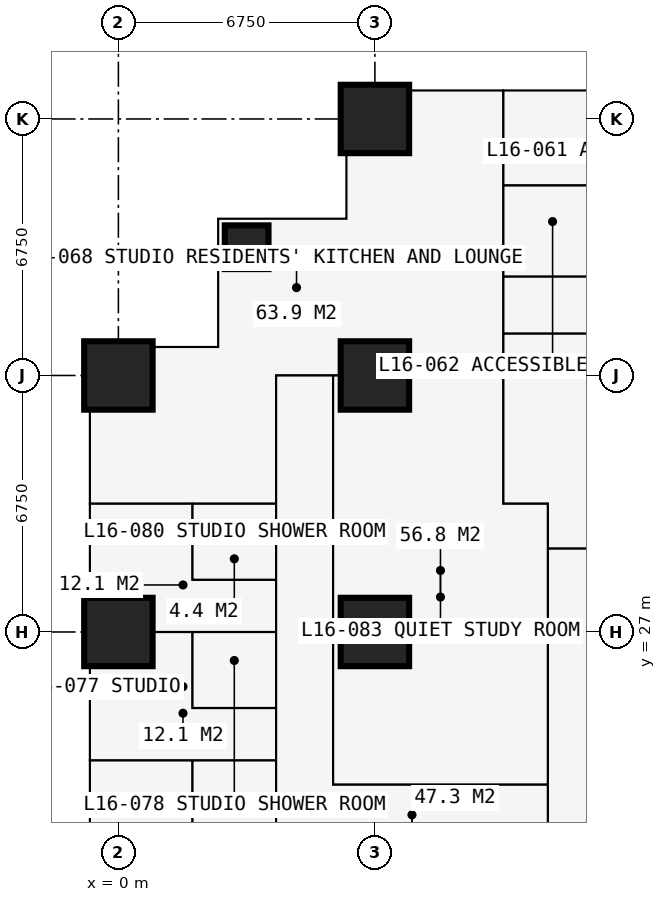
"""IFC4 building model, lengths in metres.
Left out: names, types, materials, properties, quantities, classifications, styles, units other than length and angle.
Written with IfcOpenShell. Run it as: python <this file> out.ifc"""

import sys

from ifc_helpers import new_model, si_unit, direction, frame, frame_2d, origin, origin_2d, place, context, subcontext, project, spatial, rectangle, extrude, element, fill, save


model = new_model("IFC4")
c1 = context("Model", 3, precision=1e-05, world=origin(), true_north=direction((0.0, 1.0)))
c2 = subcontext(c1, "Body", "Model", "MODEL_VIEW")
j1 = project(units=[si_unit("LENGTHUNIT", "METRE"), si_unit("PLANEANGLEUNIT", "RADIAN")], contexts=[c1])
p1 = place(None, origin())
s1 = spatial("IfcSite", under=j1, at=p1, CompositionType="ELEMENT")
p2 = place(p1, origin())
s2 = spatial("IfcBuilding", under=s1, at=p2, CompositionType="ELEMENT")
p3 = place(p2, frame((0.0, 0.0, 61.2)))
s3 = spatial("IfcBuildingStorey", under=s2, at=p3, CompositionType="ELEMENT", Elevation=61.2)
for number, where, z_axis, x_axis in (
    (1, (0.0, 27.0, 0.0), (0.0, 0.0, 1.0), (1.0, 0.0, 0.0)),
    (2, (0.0, 33.75, 0.0), (0.0, 0.0, 1.0), (1.0, 0.0, 0.0)),
):
    element("IfcColumn", number, at=place(p3, frame(where, z_axis=z_axis, x_axis=x_axis)), inside=s3, PredefinedType="COLUMN", context=c2, shape_type="SweptSolid", body=[
        extrude(rectangle(XDim=1.8, YDim=1.8, at=origin_2d()), origin(), (0.0, 0.0, 1.0), 3.6),
    ])
p4 = place(p3, frame((3.375, 37.125, 0.0), z_axis=(0.0, 0.0, 1.0), x_axis=(1.0, 0.0, 0.0)))
e3 = element("IfcColumn", 3, at=p4, inside=s3, PredefinedType="COLUMN", context=c2, shape_type="SweptSolid", body=[
    extrude(rectangle(XDim=1.15, YDim=1.15, at=origin_2d()), origin(), (0.0, 0.0, 1.0), 3.6),
])
for number, where, z_axis, x_axis in (
    (4, (6.75, 27.0, 0.0), (0.0, 0.0, 1.0), (1.0, 0.0, 0.0)),
    (5, (6.75, 33.75, 0.0), (0.0, 0.0, 1.0), (1.0, 0.0, 0.0)),
    (6, (6.75, 40.5, 0.0), (0.0, 0.0, 1.0), (1.0, 0.0, 0.0)),
):
    element("IfcColumn", number, at=place(p3, frame(where, z_axis=z_axis, x_axis=x_axis)), inside=s3, PredefinedType="COLUMN", context=c2, shape_type="SweptSolid", body=[
        extrude(rectangle(XDim=1.8, YDim=1.8, at=origin_2d()), origin(), (0.0, 0.0, 1.0), 3.6),
    ])
p5 = place(p3, frame((6.0, 41.25, 0.0), z_axis=(0.0, 0.0, 1.0), x_axis=(0.0, -1.0, 0.0)))
e7 = element("IfcWall", 7, at=p5, inside=s3, PredefinedType="SOLIDWALL", context=c2, shape_type="SweptSolid", body=[
    extrude(rectangle(XDim=3.375, YDim=0.3, at=frame_2d((1.688, 0.0))), origin(), (0.0, 0.0, 1.0), 3.375),
])
p6 = place(p5, frame((1.833, 0.0, 0.9)))
e8 = element("IfcOpeningElement", 8, at=p6, cuts=e7, PredefinedType="OPENING", context=c2, shape_type="SweptSolid", body=[
    extrude(rectangle(XDim=1.2, YDim=1.8, at=frame_2d((0.6, 0.9))), frame((0.0, 0.16, 0.0), z_axis=(0.0, -1.0, 0.0), x_axis=(1.0, 0.0, 0.0)), (0.0, 0.0, 1.0), 0.32),
])
p7 = place(p3, frame((6.0, 37.875, 0.0), z_axis=(0.0, 0.0, 1.0), x_axis=(-1.0, 0.0, 0.0)))
e9 = element("IfcWall", 9, at=p7, inside=s3, PredefinedType="SOLIDWALL", context=c2, shape_type="SweptSolid", body=[
    extrude(rectangle(XDim=3.375, YDim=0.3, at=frame_2d((1.688, 0.0))), origin(), (0.0, 0.0, 1.0), 3.375),
])
p8 = place(p7, frame((0.788, 0.0, 0.6)))
e10 = element("IfcOpeningElement", 10, at=p8, cuts=e9, PredefinedType="OPENING", context=c2, shape_type="SweptSolid", body=[
    extrude(rectangle(XDim=1.8, YDim=2.1, at=frame_2d((0.9, 1.05))), frame((0.0, 0.16, 0.0), z_axis=(0.0, -1.0, 0.0), x_axis=(1.0, 0.0, 0.0)), (0.0, 0.0, 1.0), 0.32),
])
p9 = place(p3, frame((2.625, 37.875, 0.0), z_axis=(0.0, 0.0, 1.0), x_axis=(0.0, -1.0, 0.0)))
e11 = element("IfcWall", 11, at=p9, inside=s3, PredefinedType="SOLIDWALL", context=c2, shape_type="SweptSolid", body=[
    extrude(rectangle(XDim=3.375, YDim=0.3, at=frame_2d((1.688, 0.0))), origin(), (0.0, 0.0, 1.0), 3.375),
])
p10 = place(p9, frame((0.788, 0.0, 0.6)))
e12 = element("IfcOpeningElement", 12, at=p10, cuts=e11, PredefinedType="OPENING", context=c2, shape_type="SweptSolid", body=[
    extrude(rectangle(XDim=1.8, YDim=2.1, at=frame_2d((0.9, 1.05))), frame((0.0, 0.16, 0.0), z_axis=(0.0, -1.0, 0.0), x_axis=(1.0, 0.0, 0.0)), (0.0, 0.0, 1.0), 0.32),
])
p11 = place(p3, frame((2.625, 34.5, 0.0), z_axis=(0.0, 0.0, 1.0), x_axis=(-1.0, 0.0, 0.0)))
e13 = element("IfcWall", 13, at=p11, inside=s3, PredefinedType="SOLIDWALL", context=c2, shape_type="SweptSolid", body=[
    extrude(rectangle(XDim=3.375, YDim=0.3, at=frame_2d((1.688, 0.0))), origin(), (0.0, 0.0, 1.0), 3.375),
])
p12 = place(p11, frame((0.343, 0.0, 0.9)))
e14 = element("IfcOpeningElement", 14, at=p12, cuts=e13, PredefinedType="OPENING", context=c2, shape_type="SweptSolid", body=[
    extrude(rectangle(XDim=1.2, YDim=1.8, at=frame_2d((0.6, 0.9))), frame((0.0, 0.16, 0.0), z_axis=(0.0, -1.0, 0.0), x_axis=(1.0, 0.0, 0.0)), (0.0, 0.0, 1.0), 0.32),
])
p13 = place(p3, frame((-0.734, 23.625, 0.0), z_axis=(0.0, 0.0, 1.0), x_axis=(1.0, 0.0, 0.0)))
e15 = element("IfcWall", 15, at=p13, inside=s3, PredefinedType="PARTITIONING", context=c2, shape_type="SweptSolid", body=[
    extrude(rectangle(XDim=4.884, YDim=0.175, at=frame_2d((2.442, 0.0))), origin(), (0.0, 0.0, 1.0), 3.375),
])
p14 = place(p3, frame((-0.734, 27.0, 0.0), z_axis=(0.0, 0.0, 1.0), x_axis=(1.0, 0.0, 0.0)))
e16 = element("IfcWall", 16, at=p14, inside=s3, PredefinedType="PARTITIONING", context=c2, shape_type="SweptSolid", body=[
    extrude(rectangle(XDim=4.884, YDim=0.175, at=frame_2d((2.442, 0.0))), origin(), (0.0, 0.0, 1.0), 2.61),
])
p15 = place(p3, frame((-0.734, 30.375, 0.0), z_axis=(0.0, 0.0, 1.0), x_axis=(1.0, 0.0, 0.0)))
e17 = element("IfcWall", 17, at=p15, inside=s3, PredefinedType="PARTITIONING", context=c2, shape_type="SweptSolid", body=[
    extrude(rectangle(XDim=4.884, YDim=0.15, at=frame_2d((2.442, 0.0))), origin(), (0.0, 0.0, 1.0), 3.375),
])
for number, where, z_axis, x_axis in (
    (18, (1.95, 21.625, 0.0), (0.0, 0.0, 1.0), (0.0, 1.0, 0.0)),
    (19, (1.95, 25.0, 0.0), (0.0, 0.0, 1.0), (0.0, 1.0, 0.0)),
):
    element("IfcWall", number, at=place(p3, frame(where, z_axis=z_axis, x_axis=x_axis)), inside=s3, PredefinedType="PARTITIONING", context=c2, shape_type="SweptSolid", body=[
        extrude(rectangle(XDim=2.0, YDim=0.1, at=frame_2d((1.0, 0.0))), origin(), (0.0, 0.0, 1.0), 3.375),
    ])
p16 = place(p3, frame((1.95, 25.0, 0.0), z_axis=(0.0, 0.0, 1.0), x_axis=(1.0, 0.0, 0.0)))
e20 = element("IfcWall", 20, at=p16, inside=s3, PredefinedType="PARTITIONING", context=c2, shape_type="SweptSolid", body=[
    extrude(rectangle(XDim=2.2, YDim=0.1, at=frame_2d((1.1, 0.0))), origin(), (0.0, 0.0, 1.0), 3.375),
])
p17 = place(p16, frame((0.65, 0.0, 0.0)))
e21 = element("IfcOpeningElement", 21, at=p17, cuts=e20, PredefinedType="OPENING", context=c2, shape_type="SweptSolid", body=[
    extrude(rectangle(XDim=0.9, YDim=2.2, at=frame_2d((0.45, 1.1))), frame((0.0, 0.06, 0.0), z_axis=(0.0, -1.0, 0.0), x_axis=(1.0, 0.0, 0.0)), (0.0, 0.0, 1.0), 0.12),
])
p18 = place(p3, frame((1.95, 28.375, 0.0), z_axis=(0.0, 0.0, 1.0), x_axis=(0.0, 1.0, 0.0)))
e22 = element("IfcWall", 22, at=p18, inside=s3, PredefinedType="PARTITIONING", context=c2, shape_type="SweptSolid", body=[
    extrude(rectangle(XDim=2.0, YDim=0.1, at=frame_2d((1.0, 0.0))), origin(), (0.0, 0.0, 1.0), 3.375),
])
p19 = place(p3, frame((1.95, 28.375, 0.0), z_axis=(0.0, 0.0, 1.0), x_axis=(1.0, 0.0, 0.0)))
e23 = element("IfcWall", 23, at=p19, inside=s3, PredefinedType="PARTITIONING", context=c2, shape_type="SweptSolid", body=[
    extrude(rectangle(XDim=2.2, YDim=0.1, at=frame_2d((1.1, 0.0))), origin(), (0.0, 0.0, 1.0), 3.375),
])
p20 = place(p19, frame((0.65, 0.0, 0.0)))
e24 = element("IfcOpeningElement", 24, at=p20, cuts=e23, PredefinedType="OPENING", context=c2, shape_type="SweptSolid", body=[
    extrude(rectangle(XDim=0.9, YDim=2.2, at=frame_2d((0.45, 1.1))), frame((0.0, 0.06, 0.0), z_axis=(0.0, -1.0, 0.0), x_axis=(1.0, 0.0, 0.0)), (0.0, 0.0, 1.0), 0.12),
])
p21 = place(p3, frame((4.15, 10.125, 0.0), z_axis=(0.0, 0.0, 1.0), x_axis=(0.0, 1.0, 0.0)))
e25 = element("IfcWall", 25, at=p21, inside=s3, PredefinedType="PARTITIONING", context=c2, shape_type="SweptSolid", body=[
    extrude(rectangle(XDim=23.625, YDim=0.1, at=frame_2d((11.812, 0.0))), origin(), (0.0, 0.0, 1.0), 3.375),
])
p22 = place(p21, frame((0.2, 0.0, 0.0)))
e26 = element("IfcOpeningElement", 26, at=p22, cuts=e25, PredefinedType="OPENING", context=c2, shape_type="SweptSolid", body=[
    extrude(rectangle(XDim=0.95, YDim=2.2, at=frame_2d((0.475, 1.1))), frame((0.0, 0.06, 0.0), z_axis=(0.0, -1.0, 0.0), x_axis=(1.0, 0.0, 0.0)), (0.0, 0.0, 1.0), 0.12),
])
p23 = place(p21, frame((3.625, 0.0, 0.0)))
e27 = element("IfcOpeningElement", 27, at=p23, cuts=e25, PredefinedType="OPENING", context=c2, shape_type="SweptSolid", body=[
    extrude(rectangle(XDim=0.95, YDim=2.2, at=frame_2d((0.475, 1.1))), frame((0.0, 0.06, 0.0), z_axis=(0.0, -1.0, 0.0), x_axis=(1.0, 0.0, 0.0)), (0.0, 0.0, 1.0), 0.12),
])
p24 = place(p21, frame((7.0, 0.0, 0.0)))
e28 = element("IfcOpeningElement", 28, at=p24, cuts=e25, PredefinedType="OPENING", context=c2, shape_type="SweptSolid", body=[
    extrude(rectangle(XDim=0.95, YDim=2.2, at=frame_2d((0.475, 1.1))), frame((0.0, 0.06, 0.0), z_axis=(0.0, -1.0, 0.0), x_axis=(1.0, 0.0, 0.0)), (0.0, 0.0, 1.0), 0.12),
])
p25 = place(p21, frame((10.375, 0.0, 0.0)))
e29 = element("IfcOpeningElement", 29, at=p25, cuts=e25, PredefinedType="OPENING", context=c2, shape_type="SweptSolid", body=[
    extrude(rectangle(XDim=0.95, YDim=2.2, at=frame_2d((0.475, 1.1))), frame((0.0, 0.06, 0.0), z_axis=(0.0, -1.0, 0.0), x_axis=(1.0, 0.0, 0.0)), (0.0, 0.0, 1.0), 0.12),
])
p26 = place(p21, frame((13.75, 0.0, 0.0)))
e30 = element("IfcOpeningElement", 30, at=p26, cuts=e25, PredefinedType="OPENING", context=c2, shape_type="SweptSolid", body=[
    extrude(rectangle(XDim=0.95, YDim=2.2, at=frame_2d((0.475, 1.1))), frame((0.0, 0.06, 0.0), z_axis=(0.0, -1.0, 0.0), x_axis=(1.0, 0.0, 0.0)), (0.0, 0.0, 1.0), 0.12),
])
p27 = place(p21, frame((17.125, 0.0, 0.0)))
e31 = element("IfcOpeningElement", 31, at=p27, cuts=e25, PredefinedType="OPENING", context=c2, shape_type="SweptSolid", body=[
    extrude(rectangle(XDim=0.95, YDim=2.2, at=frame_2d((0.475, 1.1))), frame((0.0, 0.06, 0.0), z_axis=(0.0, -1.0, 0.0), x_axis=(1.0, 0.0, 0.0)), (0.0, 0.0, 1.0), 0.12),
])
p28 = place(p3, frame((4.15, 33.75, 0.0), z_axis=(0.0, 0.0, 1.0), x_axis=(1.0, 0.0, 0.0)))
e32 = element("IfcWall", 32, at=p28, inside=s3, PredefinedType="PARTITIONING", context=c2, shape_type="SweptSolid", body=[
    extrude(rectangle(XDim=5.975, YDim=0.15, at=frame_2d((2.988, 0.0))), origin(), (0.0, 0.0, 1.0), 2.877),
])
p29 = place(p3, frame((5.65, 22.988, 0.0), z_axis=(0.0, 0.0, 1.0), x_axis=(0.0, 1.0, 0.0)))
e33 = element("IfcWall", 33, at=p29, inside=s3, PredefinedType="PARTITIONING", context=c2, shape_type="SweptSolid", body=[
    extrude(rectangle(XDim=10.762, YDim=0.15, at=frame_2d((5.381, 0.0))), origin(), (0.0, 0.0, 1.0), 3.375),
])
p30 = place(p29, frame((4.95, 0.0, 0.0)))
e34 = element("IfcOpeningElement", 34, at=p30, cuts=e33, PredefinedType="OPENING", context=c2, shape_type="SweptSolid", body=[
    extrude(rectangle(XDim=0.95, YDim=2.2, at=frame_2d((0.475, 1.1))), frame((0.0, 0.085, 0.0), z_axis=(0.0, -1.0, 0.0), x_axis=(1.0, 0.0, 0.0)), (0.0, 0.0, 1.0), 0.17),
])
p31 = place(p3, frame((5.65, 22.988, 0.0), z_axis=(0.0, 0.0, 1.0), x_axis=(1.0, 0.0, 0.0)))
e35 = element("IfcWall", 35, at=p31, inside=s3, PredefinedType="PARTITIONING", context=c2, shape_type="SweptSolid", body=[
    extrude(rectangle(XDim=5.65, YDim=0.15, at=frame_2d((2.825, 0.0))), origin(), (0.0, 0.0, 1.0), 3.375),
])
p32 = place(p3, frame((10.125, 30.375, 0.0), z_axis=(0.0, 0.0, 1.0), x_axis=(0.0, 1.0, 0.0)))
e36 = element("IfcWall", 36, at=p32, inside=s3, PredefinedType="PARTITIONING", context=c2, shape_type="SweptSolid", body=[
    extrude(rectangle(XDim=10.859, YDim=0.15, at=frame_2d((5.429, 0.0))), origin(), (0.0, 0.0, 1.0), 3.375),
])
p33 = place(p32, frame((4.725, 0.0, 0.0)))
e37 = element("IfcOpeningElement", 37, at=p33, cuts=e36, PredefinedType="OPENING", context=c2, shape_type="SweptSolid", body=[
    extrude(rectangle(XDim=1.0, YDim=2.2, at=frame_2d((0.5, 1.1))), frame((0.0, 0.085, 0.0), z_axis=(0.0, -1.0, 0.0), x_axis=(1.0, 0.0, 0.0)), (0.0, 0.0, 1.0), 0.17),
])
p34 = place(p3, frame((10.125, 30.375, 0.0), z_axis=(0.0, 0.0, 1.0), x_axis=(1.0, 0.0, 0.0)))
e38 = element("IfcWall", 38, at=p34, inside=s3, PredefinedType="PARTITIONING", context=c2, shape_type="SweptSolid", body=[
    extrude(rectangle(XDim=1.175, YDim=0.15, at=frame_2d((0.587, 0.0))), origin(), (0.0, 0.0, 1.0), 3.375),
])
p35 = place(p3, frame((10.125, 34.85, 0.0), z_axis=(0.0, 0.0, 1.0), x_axis=(1.0, 0.0, 0.0)))
e39 = element("IfcWall", 39, at=p35, inside=s3, PredefinedType="PARTITIONING", context=c2, shape_type="SweptSolid", body=[
    extrude(rectangle(XDim=10.762, YDim=0.15, at=frame_2d((5.381, 0.0))), origin(), (0.0, 0.0, 1.0), 3.375),
])
p36 = place(p35, frame((4.9, 0.0, 0.0)))
e40 = element("IfcOpeningElement", 40, at=p36, cuts=e39, PredefinedType="OPENING", context=c2, shape_type="SweptSolid", body=[
    extrude(rectangle(XDim=0.95, YDim=2.2, at=frame_2d((0.475, 1.1))), frame((0.0, 0.085, 0.0), z_axis=(0.0, -1.0, 0.0), x_axis=(1.0, 0.0, 0.0)), (0.0, 0.0, 1.0), 0.17),
])
p37 = place(p3, frame((10.125, 36.35, 0.0), z_axis=(0.0, 0.0, 1.0), x_axis=(1.0, 0.0, 0.0)))
e41 = element("IfcWall", 41, at=p37, inside=s3, PredefinedType="PARTITIONING", context=c2, shape_type="SweptSolid", body=[
    extrude(rectangle(XDim=23.625, YDim=0.15, at=frame_2d((11.812, 0.0))), origin(), (0.0, 0.0, 1.0), 3.375),
])
p38 = place(p37, frame((20.5, 0.0, 0.0)))
e42 = element("IfcOpeningElement", 42, at=p38, cuts=e41, PredefinedType="OPENING", context=c2, shape_type="SweptSolid", body=[
    extrude(rectangle(XDim=0.95, YDim=2.2, at=frame_2d((0.475, 1.1))), frame((0.0, 0.085, 0.0), z_axis=(0.0, -1.0, 0.0), x_axis=(1.0, 0.0, 0.0)), (0.0, 0.0, 1.0), 0.17),
])
p39 = place(p37, frame((17.125, 0.0, 0.0)))
e43 = element("IfcOpeningElement", 43, at=p39, cuts=e41, PredefinedType="OPENING", context=c2, shape_type="SweptSolid", body=[
    extrude(rectangle(XDim=0.95, YDim=2.2, at=frame_2d((0.475, 1.1))), frame((0.0, 0.085, 0.0), z_axis=(0.0, -1.0, 0.0), x_axis=(1.0, 0.0, 0.0)), (0.0, 0.0, 1.0), 0.17),
])
p40 = place(p37, frame((13.7, 0.0, 0.0)))
e44 = element("IfcOpeningElement", 44, at=p40, cuts=e41, PredefinedType="OPENING", context=c2, shape_type="SweptSolid", body=[
    extrude(rectangle(XDim=0.95, YDim=2.2, at=frame_2d((0.475, 1.1))), frame((0.0, 0.085, 0.0), z_axis=(0.0, -1.0, 0.0), x_axis=(1.0, 0.0, 0.0)), (0.0, 0.0, 1.0), 0.17),
])
p41 = place(p37, frame((4.2, 0.0, 0.0)))
e45 = element("IfcOpeningElement", 45, at=p41, cuts=e41, PredefinedType="OPENING", context=c2, shape_type="SweptSolid", body=[
    extrude(rectangle(XDim=0.95, YDim=2.2, at=frame_2d((0.475, 1.1))), frame((0.0, 0.085, 0.0), z_axis=(0.0, -1.0, 0.0), x_axis=(1.0, 0.0, 0.0)), (0.0, 0.0, 1.0), 0.17),
])
p42 = place(p37, frame((10.95, 0.0, 0.0)))
e46 = element("IfcOpeningElement", 46, at=p42, cuts=e41, PredefinedType="OPENING", context=c2, shape_type="SweptSolid", body=[
    extrude(rectangle(XDim=0.95, YDim=2.2, at=frame_2d((0.475, 1.1))), frame((0.0, 0.085, 0.0), z_axis=(0.0, -1.0, 0.0), x_axis=(1.0, 0.0, 0.0)), (0.0, 0.0, 1.0), 0.17),
])
p43 = place(p3, frame((10.125, 38.75, 0.0), z_axis=(0.0, 0.0, 1.0), x_axis=(1.0, 0.0, 0.0)))
e47 = element("IfcWall", 47, at=p43, inside=s3, PredefinedType="PARTITIONING", context=c2, shape_type="SweptSolid", body=[
    extrude(rectangle(XDim=2.6, YDim=0.1, at=frame_2d((1.3, 0.0))), origin(), (0.0, 0.0, 1.0), 3.375),
])
p44 = place(p43, frame((0.85, 0.0, 0.0)))
e48 = element("IfcOpeningElement", 48, at=p44, cuts=e47, PredefinedType="OPENING", context=c2, shape_type="SweptSolid", body=[
    extrude(rectangle(XDim=0.9, YDim=2.2, at=frame_2d((0.45, 1.1))), frame((0.0, 0.06, 0.0), z_axis=(0.0, -1.0, 0.0), x_axis=(1.0, 0.0, 0.0)), (0.0, 0.0, 1.0), 0.12),
])
p45 = place(p3, frame((11.3, 11.3, 0.0), z_axis=(0.0, 0.0, 1.0), x_axis=(0.0, 1.0, 0.0)))
e49 = element("IfcWall", 49, at=p45, inside=s3, PredefinedType="PARTITIONING", context=c2, shape_type="SweptSolid", body=[
    extrude(rectangle(XDim=19.075, YDim=0.15, at=frame_2d((9.538, 0.0))), origin(), (0.0, 0.0, 1.0), 3.375),
])
p46 = place(p45, frame((10.137, 0.0, 0.0)))
e50 = element("IfcOpeningElement", 50, at=p46, cuts=e49, PredefinedType="OPENING", context=c2, shape_type="SweptSolid", body=[
    extrude(rectangle(XDim=1.0, YDim=2.2, at=frame_2d((0.5, 1.1))), frame((0.0, 0.085, 0.0), z_axis=(0.0, -1.0, 0.0), x_axis=(1.0, 0.0, 0.0)), (0.0, 0.0, 1.0), 0.17),
])
p47 = place(p3, frame((11.3, 29.2, 0.0), z_axis=(0.0, 0.0, 1.0), x_axis=(1.0, 0.0, 0.0)))
e51 = element("IfcWall", 51, at=p47, inside=s3, PredefinedType="PARTITIONING", context=c2, shape_type="SweptSolid", body=[
    extrude(rectangle(XDim=19.075, YDim=0.15, at=frame_2d((9.538, 0.0))), origin(), (0.0, 0.0, 1.0), 3.375),
])
p48 = place(p47, frame((12.875, 0.0, 0.0)))
e52 = element("IfcOpeningElement", 52, at=p48, cuts=e51, PredefinedType="OPENING", context=c2, shape_type="SweptSolid", body=[
    extrude(rectangle(XDim=1.0, YDim=2.2, at=frame_2d((0.5, 1.1))), frame((0.0, 0.085, 0.0), z_axis=(0.0, -1.0, 0.0), x_axis=(1.0, 0.0, 0.0)), (0.0, 0.0, 1.0), 0.17),
])
p49 = place(p47, frame((10.438, 0.0, 0.0)))
e53 = element("IfcOpeningElement", 53, at=p49, cuts=e51, PredefinedType="OPENING", context=c2, shape_type="SweptSolid", body=[
    extrude(rectangle(XDim=1.0, YDim=2.2, at=frame_2d((0.5, 1.1))), frame((0.0, 0.085, 0.0), z_axis=(0.0, -1.0, 0.0), x_axis=(1.0, 0.0, 0.0)), (0.0, 0.0, 1.0), 0.17),
])
p50 = place(p47, frame((14.875, 0.0, 0.0)))
e54 = element("IfcOpeningElement", 54, at=p50, cuts=e51, PredefinedType="OPENING", context=c2, shape_type="SweptSolid", body=[
    extrude(rectangle(XDim=0.95, YDim=2.2, at=frame_2d((0.475, 1.1))), frame((0.0, 0.085, 0.0), z_axis=(0.0, -1.0, 0.0), x_axis=(1.0, 0.0, 0.0)), (0.0, 0.0, 1.0), 0.17),
])
p51 = place(p6, origin())
e55 = element("IfcWindow", 55, at=p51, inside=s3, PartitioningType="SINGLE_PANEL", PredefinedType="WINDOW", context=c2, shape_type="SweptSolid", body=[
    extrude(rectangle(XDim=1.2, YDim=1.8, at=frame_2d((0.6, 0.9))), frame((0.0, 0.03, 0.0), z_axis=(0.0, -1.0, 0.0), x_axis=(1.0, 0.0, 0.0)), (0.0, 0.0, 1.0), 0.06),
])
fill(e8, e55)
p52 = place(p8, origin())
e56 = element("IfcWindow", 56, at=p52, inside=s3, PartitioningType="SINGLE_PANEL", PredefinedType="WINDOW", context=c2, shape_type="SweptSolid", body=[
    extrude(rectangle(XDim=1.8, YDim=2.1, at=frame_2d((0.9, 1.05))), frame((0.0, 0.03, 0.0), z_axis=(0.0, -1.0, 0.0), x_axis=(1.0, 0.0, 0.0)), (0.0, 0.0, 1.0), 0.06),
])
fill(e10, e56)
p53 = place(p10, origin())
e57 = element("IfcWindow", 57, at=p53, inside=s3, PartitioningType="SINGLE_PANEL", PredefinedType="WINDOW", context=c2, shape_type="SweptSolid", body=[
    extrude(rectangle(XDim=1.8, YDim=2.1, at=frame_2d((0.9, 1.05))), frame((0.0, 0.03, 0.0), z_axis=(0.0, -1.0, 0.0), x_axis=(1.0, 0.0, 0.0)), (0.0, 0.0, 1.0), 0.06),
])
fill(e12, e57)
p54 = place(p12, origin())
e58 = element("IfcWindow", 58, at=p54, inside=s3, PartitioningType="SINGLE_PANEL", PredefinedType="WINDOW", context=c2, shape_type="SweptSolid", body=[
    extrude(rectangle(XDim=1.2, YDim=1.8, at=frame_2d((0.6, 0.9))), frame((0.0, 0.03, 0.0), z_axis=(0.0, -1.0, 0.0), x_axis=(1.0, 0.0, 0.0)), (0.0, 0.0, 1.0), 0.06),
])
fill(e14, e58)
p55 = place(p44, origin())
e59 = element("IfcDoor", 59, at=p55, inside=s3, OperationType="SINGLE_SWING_RIGHT", PredefinedType="DOOR", context=c2, shape_type="SweptSolid", body=[
    extrude(rectangle(XDim=0.9, YDim=2.2, at=frame_2d((0.45, 1.1))), frame((0.0, 0.025, 0.0), z_axis=(0.0, -1.0, 0.0), x_axis=(1.0, 0.0, 0.0)), (0.0, 0.0, 1.0), 0.05),
])
fill(e48, e59)
p56 = place(p33, origin())
e60 = element("IfcDoor", 60, at=p56, inside=s3, OperationType="SINGLE_SWING_LEFT", PredefinedType="DOOR", context=c2, shape_type="SweptSolid", body=[
    extrude(rectangle(XDim=1.0, YDim=2.2, at=frame_2d((0.5, 1.1))), frame((0.0, 0.025, 0.0), z_axis=(0.0, -1.0, 0.0), x_axis=(1.0, 0.0, 0.0)), (0.0, 0.0, 1.0), 0.05),
])
fill(e37, e60)
p57 = place(p26, origin())
e61 = element("IfcDoor", 61, at=p57, inside=s3, OperationType="SINGLE_SWING_LEFT", PredefinedType="DOOR", context=c2, shape_type="SweptSolid", body=[
    extrude(rectangle(XDim=0.95, YDim=2.2, at=frame_2d((0.475, 1.1))), frame((0.0, 0.025, 0.0), z_axis=(0.0, -1.0, 0.0), x_axis=(1.0, 0.0, 0.0)), (0.0, 0.0, 1.0), 0.05),
])
fill(e30, e61)
p58 = place(p17, origin())
e62 = element("IfcDoor", 62, at=p58, inside=s3, OperationType="SINGLE_SWING_RIGHT", PredefinedType="DOOR", context=c2, shape_type="SweptSolid", body=[
    extrude(rectangle(XDim=0.9, YDim=2.2, at=frame_2d((0.45, 1.1))), frame((0.0, 0.025, 0.0), z_axis=(0.0, -1.0, 0.0), x_axis=(1.0, 0.0, 0.0)), (0.0, 0.0, 1.0), 0.05),
])
fill(e21, e62)
p59 = place(p27, origin())
e63 = element("IfcDoor", 63, at=p59, inside=s3, OperationType="SINGLE_SWING_LEFT", PredefinedType="DOOR", context=c2, shape_type="SweptSolid", body=[
    extrude(rectangle(XDim=0.95, YDim=2.2, at=frame_2d((0.475, 1.1))), frame((0.0, 0.025, 0.0), z_axis=(0.0, -1.0, 0.0), x_axis=(1.0, 0.0, 0.0)), (0.0, 0.0, 1.0), 0.05),
])
fill(e31, e63)
p60 = place(p20, origin())
e64 = element("IfcDoor", 64, at=p60, inside=s3, OperationType="SINGLE_SWING_RIGHT", PredefinedType="DOOR", context=c2, shape_type="SweptSolid", body=[
    extrude(rectangle(XDim=0.9, YDim=2.2, at=frame_2d((0.45, 1.1))), frame((0.0, 0.025, 0.0), z_axis=(0.0, -1.0, 0.0), x_axis=(1.0, 0.0, 0.0)), (0.0, 0.0, 1.0), 0.05),
])
fill(e24, e64)
p61 = place(p46, origin())
e65 = element("IfcDoor", 65, at=p61, inside=s3, OperationType="SINGLE_SWING_LEFT", PredefinedType="DOOR", context=c2, shape_type="SweptSolid", body=[
    extrude(rectangle(XDim=1.0, YDim=2.2, at=frame_2d((0.5, 1.1))), frame((0.0, 0.025, 0.0), z_axis=(0.0, -1.0, 0.0), x_axis=(1.0, 0.0, 0.0)), (0.0, 0.0, 1.0), 0.05),
])
fill(e50, e65)
p62 = place(p30, origin())
e66 = element("IfcDoor", 66, at=p62, inside=s3, OperationType="SINGLE_SWING_LEFT", PredefinedType="DOOR", context=c2, shape_type="SweptSolid", body=[
    extrude(rectangle(XDim=0.95, YDim=2.2, at=frame_2d((0.475, 1.1))), frame((0.0, 0.025, 0.0), z_axis=(0.0, -1.0, 0.0), x_axis=(1.0, 0.0, 0.0)), (0.0, 0.0, 1.0), 0.05),
])
fill(e34, e66)
save(model, sys.argv[1])
